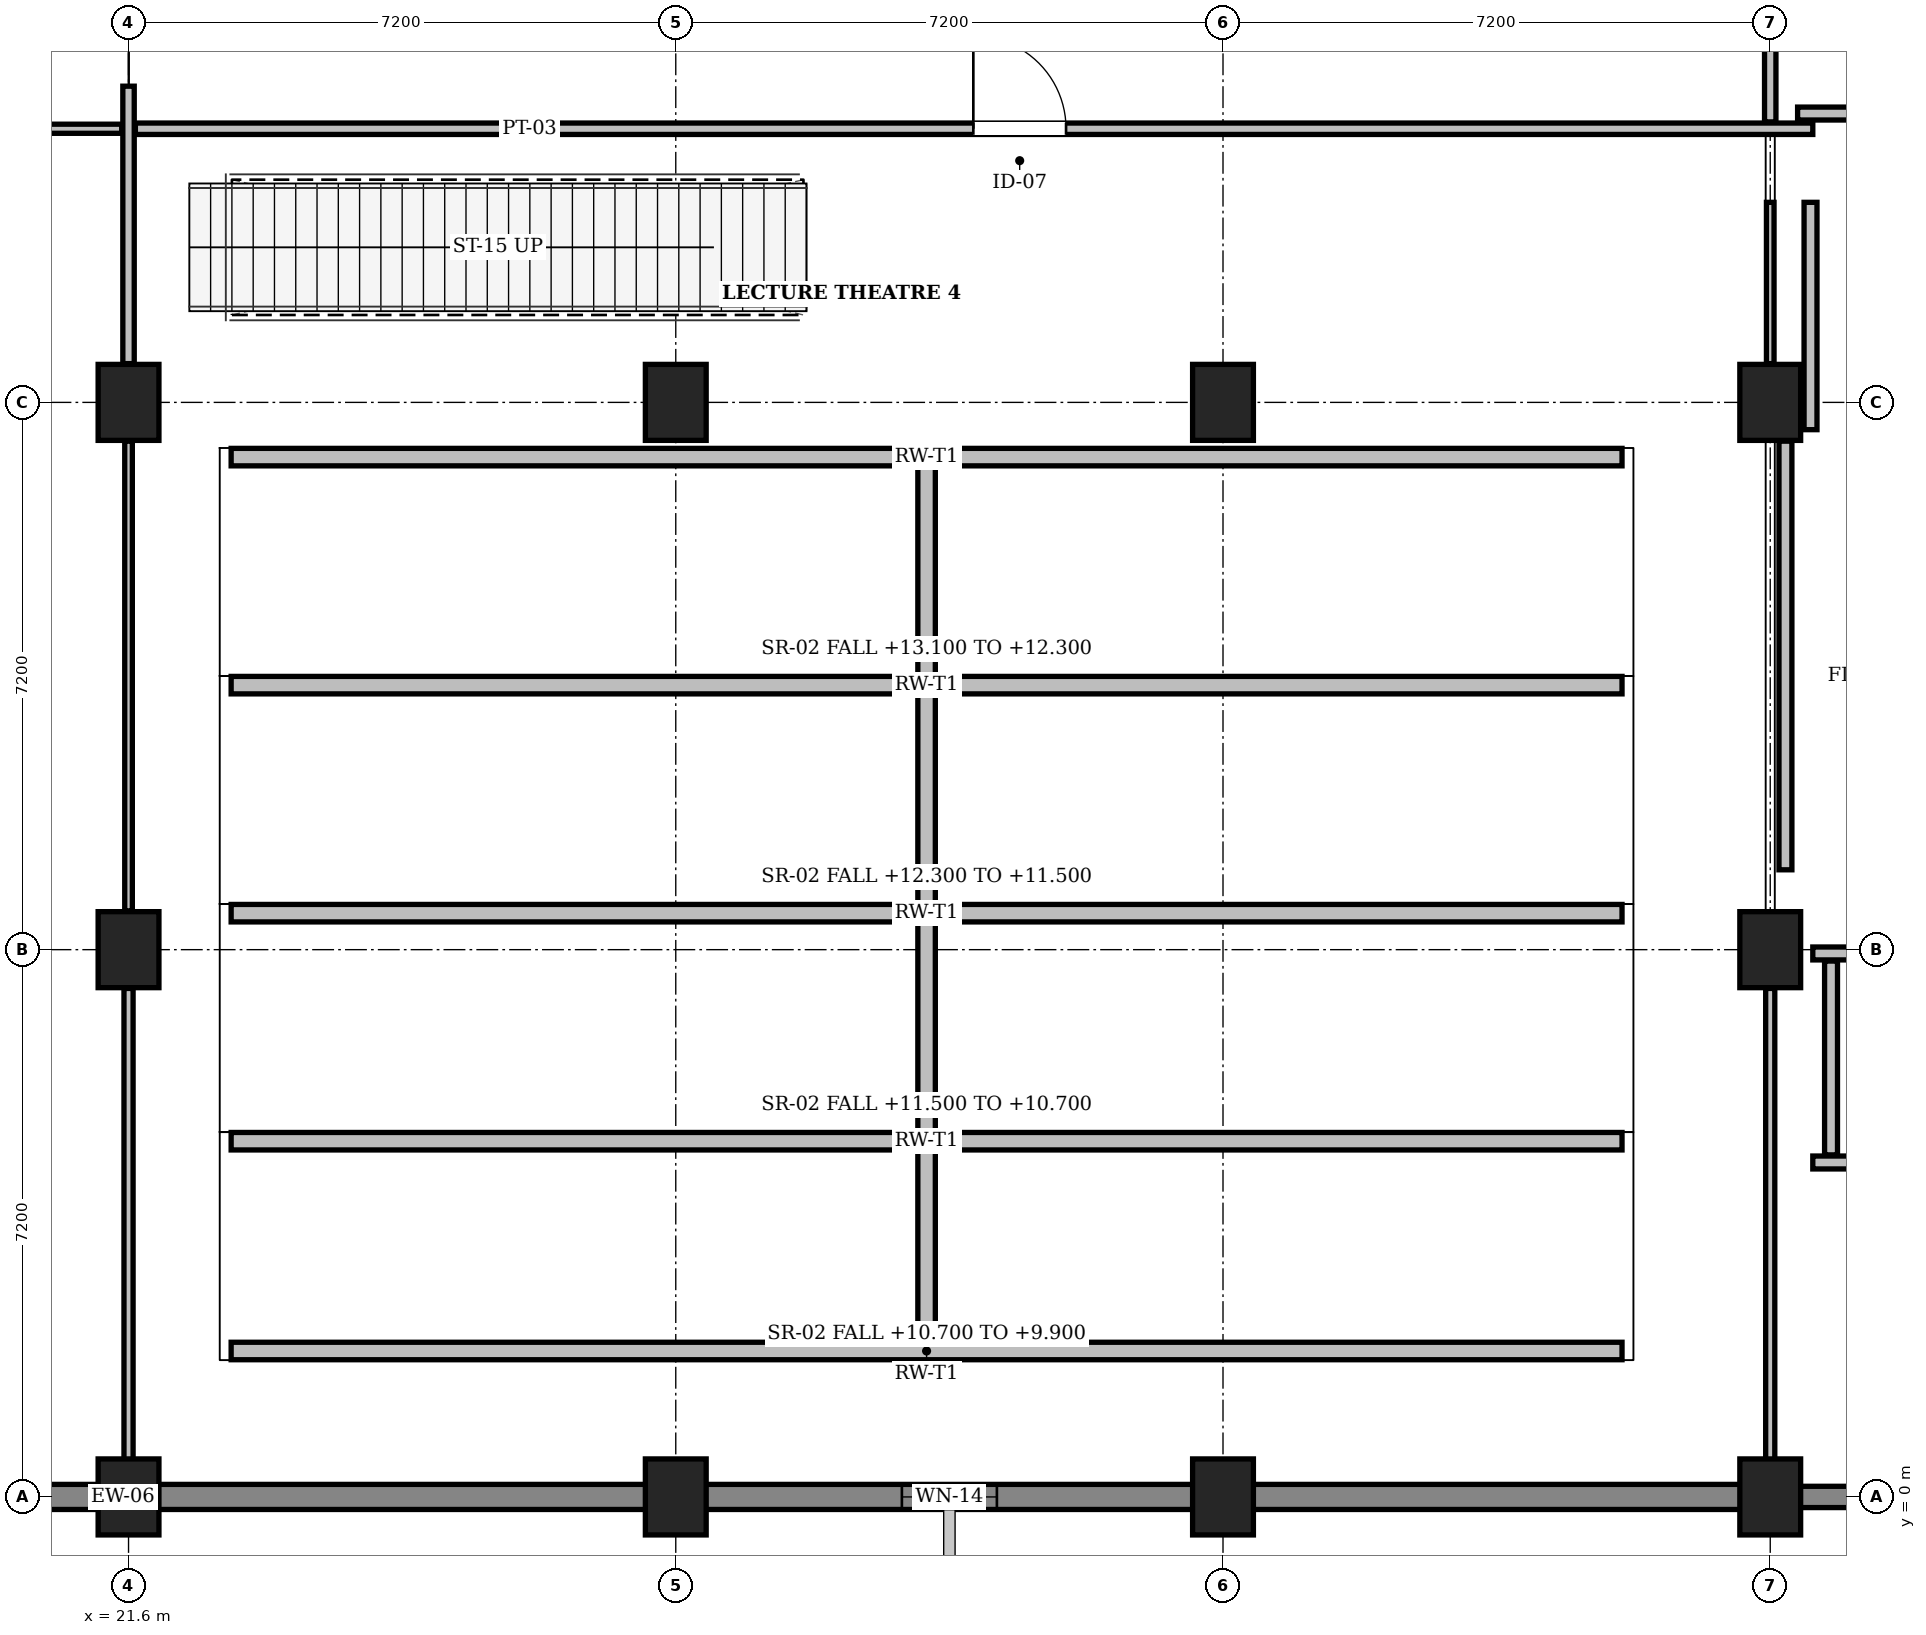
"""IFC4 building model, lengths in metres.
Left out: names, types, materials, properties, quantities, classifications, styles, units other than length and angle.
Written with IfcOpenShell. Run it as: python <this file> out.ifc"""

import sys

from ifc_helpers import new_model, si_unit, direction, frame, frame_2d, origin, origin_2d, place, context, subcontext, project, spatial, rectangle, extrude, element, fill, save


model = new_model("IFC4")
c1 = context("Model", 3, precision=1e-05, world=origin(), true_north=direction((0.0, 1.0)))
c2 = subcontext(c1, "Body", "Model", "MODEL_VIEW")
j1 = project(units=[si_unit("LENGTHUNIT", "METRE"), si_unit("PLANEANGLEUNIT", "RADIAN")], contexts=[c1])
p1 = place(None, origin())
s1 = spatial("IfcSite", under=j1, at=p1, CompositionType="ELEMENT")
p2 = place(p1, origin())
s2 = spatial("IfcBuilding", under=s1, at=p2, CompositionType="ELEMENT")
p3 = place(p2, frame((0.0, 0.0, 9.6)))
s3 = spatial("IfcBuildingStorey", under=s2, at=p3, CompositionType="ELEMENT", Elevation=9.6)
for number, where, z_axis, x_axis in (
    (1, (21.6, 0.0, 0.0), (0.0, 0.0, 1.0), (1.0, 0.0, 0.0)),
    (2, (21.6, 7.2, 0.0), (0.0, 0.0, 1.0), (1.0, 0.0, 0.0)),
    (3, (21.6, 14.4, 0.0), (0.0, 0.0, 1.0), (1.0, 0.0, 0.0)),
    (4, (28.8, 0.0, 0.0), (0.0, 0.0, 1.0), (1.0, 0.0, 0.0)),
    (5, (28.8, 14.4, 0.0), (0.0, 0.0, 1.0), (1.0, 0.0, 0.0)),
    (6, (36.0, 0.0, 0.0), (0.0, 0.0, 1.0), (1.0, 0.0, 0.0)),
    (7, (36.0, 14.4, 0.0), (0.0, 0.0, 1.0), (1.0, 0.0, 0.0)),
    (8, (43.2, 0.0, 0.0), (0.0, 0.0, 1.0), (1.0, 0.0, 0.0)),
    (9, (43.2, 7.2, 0.0), (0.0, 0.0, 1.0), (1.0, 0.0, 0.0)),
    (10, (43.2, 14.4, 0.0), (0.0, 0.0, 1.0), (1.0, 0.0, 0.0)),
):
    element("IfcColumn", number, at=place(p3, frame(where, z_axis=z_axis, x_axis=x_axis)), inside=s3, PredefinedType="COLUMN", context=c2, shape_type="SweptSolid", body=[
        extrude(rectangle(XDim=0.8, YDim=1.0, at=origin_2d()), origin(), (0.0, 0.0, 1.0), 4.8),
    ])
p4 = place(p3, frame((22.95, 1.92, 0.0), z_axis=(0.0, 0.0, 1.0), x_axis=(1.0, 0.0, 0.0)))
e11 = element("IfcWall", 11, at=p4, inside=s3, PredefinedType="SOLIDWALL", context=c2, shape_type="SweptSolid", body=[
    extrude(rectangle(XDim=18.3, YDim=0.23, at=frame_2d((9.15, 0.0))), origin(), (0.0, 0.0, 1.0), 0.13),
])
p5 = place(p3, frame((22.95, 4.68, 0.0), z_axis=(0.0, 0.0, 1.0), x_axis=(1.0, 0.0, 0.0)))
e12 = element("IfcWall", 12, at=p5, inside=s3, PredefinedType="SOLIDWALL", context=c2, shape_type="SweptSolid", body=[
    extrude(rectangle(XDim=18.3, YDim=0.23, at=frame_2d((9.15, 0.0))), origin(), (0.0, 0.0, 1.0), 0.91),
])
p6 = place(p3, frame((32.1, 2.035, 0.0), z_axis=(0.0, 0.0, 1.0), x_axis=(0.0, 1.0, 0.0)))
e13 = element("IfcWall", 13, at=p6, inside=s3, PredefinedType="SOLIDWALL", context=c2, shape_type="SweptSolid", body=[
    extrude(rectangle(XDim=2.53, YDim=0.23, at=frame_2d((1.265, 0.0))), origin(), (0.0, 0.0, 1.0), 0.51),
])
p7 = place(p3, frame((22.95, 7.68, 0.0), z_axis=(0.0, 0.0, 1.0), x_axis=(1.0, 0.0, 0.0)))
e14 = element("IfcWall", 14, at=p7, inside=s3, PredefinedType="SOLIDWALL", context=c2, shape_type="SweptSolid", body=[
    extrude(rectangle(XDim=18.3, YDim=0.23, at=frame_2d((9.15, 0.0))), origin(), (0.0, 0.0, 1.0), 1.71),
])
p8 = place(p3, frame((32.1, 4.795, 0.0), z_axis=(0.0, 0.0, 1.0), x_axis=(0.0, 1.0, 0.0)))
e15 = element("IfcWall", 15, at=p8, inside=s3, PredefinedType="SOLIDWALL", context=c2, shape_type="SweptSolid", body=[
    extrude(rectangle(XDim=2.77, YDim=0.23, at=frame_2d((1.385, 0.0))), origin(), (0.0, 0.0, 1.0), 1.31),
])
p9 = place(p3, frame((22.95, 10.68, 0.0), z_axis=(0.0, 0.0, 1.0), x_axis=(1.0, 0.0, 0.0)))
e16 = element("IfcWall", 16, at=p9, inside=s3, PredefinedType="SOLIDWALL", context=c2, shape_type="SweptSolid", body=[
    extrude(rectangle(XDim=18.3, YDim=0.23, at=frame_2d((9.15, 0.0))), origin(), (0.0, 0.0, 1.0), 2.51),
])
p10 = place(p3, frame((32.1, 7.795, 0.0), z_axis=(0.0, 0.0, 1.0), x_axis=(0.0, 1.0, 0.0)))
e17 = element("IfcWall", 17, at=p10, inside=s3, PredefinedType="SOLIDWALL", context=c2, shape_type="SweptSolid", body=[
    extrude(rectangle(XDim=2.77, YDim=0.23, at=frame_2d((1.385, 0.0))), origin(), (0.0, 0.0, 1.0), 2.11),
])
p11 = place(p3, frame((22.95, 13.68, 0.0), z_axis=(0.0, 0.0, 1.0), x_axis=(1.0, 0.0, 0.0)))
e18 = element("IfcWall", 18, at=p11, inside=s3, PredefinedType="SOLIDWALL", context=c2, shape_type="SweptSolid", body=[
    extrude(rectangle(XDim=18.3, YDim=0.23, at=frame_2d((9.15, 0.0))), origin(), (0.0, 0.0, 1.0), 3.31),
])
p12 = place(p3, frame((32.1, 10.795, 0.0), z_axis=(0.0, 0.0, 1.0), x_axis=(0.0, 1.0, 0.0)))
e19 = element("IfcWall", 19, at=p12, inside=s3, PredefinedType="SOLIDWALL", context=c2, shape_type="SweptSolid", body=[
    extrude(rectangle(XDim=2.77, YDim=0.23, at=frame_2d((1.385, 0.0))), origin(), (0.0, 0.0, 1.0), 2.91),
])
p13 = place(p3, frame((50.4, 0.0, 0.0), z_axis=(0.0, 0.0, 1.0), x_axis=(-1.0, 0.0, 0.0)))
e20 = element("IfcWall", 20, at=p13, inside=s3, PredefinedType="SOLIDWALL", context=c2, shape_type="SweptSolid", body=[
    extrude(rectangle(XDim=7.2, YDim=0.28, at=frame_2d((3.6, 0.0))), origin(), (0.0, 0.0, 1.0), 4.52),
])
p14 = place(p13, frame((3.05, 0.0, 0.95)))
e21 = element("IfcOpeningElement", 21, at=p14, cuts=e20, PredefinedType="OPENING", context=c2, shape_type="SweptSolid", body=[
    extrude(rectangle(XDim=1.1, YDim=1.55, at=frame_2d((0.55, 0.775))), frame((0.0, 0.152, 0.0), z_axis=(0.0, -1.0, 0.0), x_axis=(1.0, 0.0, 0.0)), (0.0, 0.0, 1.0), 0.304),
])
p15 = place(p3, frame((43.2, 0.0, 0.0), z_axis=(0.0, 0.0, 1.0), x_axis=(-1.0, 0.0, 0.0)))
e22 = element("IfcWall", 22, at=p15, inside=s3, PredefinedType="SOLIDWALL", context=c2, shape_type="SweptSolid", body=[
    extrude(rectangle(XDim=7.2, YDim=0.33, at=frame_2d((3.6, 0.0))), origin(), (0.0, 0.0, 1.0), 4.52),
])
p16 = place(p3, frame((36.0, 0.0, 0.0), z_axis=(0.0, 0.0, 1.0), x_axis=(-1.0, 0.0, 0.0)))
e23 = element("IfcWall", 23, at=p16, inside=s3, PredefinedType="SOLIDWALL", context=c2, shape_type="SweptSolid", body=[
    extrude(rectangle(XDim=7.2, YDim=0.33, at=frame_2d((3.6, 0.0))), origin(), (0.0, 0.0, 1.0), 4.52),
])
p17 = place(p16, frame((2.975, 0.0, 0.95)))
e24 = element("IfcOpeningElement", 24, at=p17, cuts=e23, PredefinedType="OPENING", context=c2, shape_type="SweptSolid", body=[
    extrude(rectangle(XDim=1.25, YDim=1.55, at=frame_2d((0.625, 0.775))), frame((0.0, 0.177, 0.0), z_axis=(0.0, -1.0, 0.0), x_axis=(1.0, 0.0, 0.0)), (0.0, 0.0, 1.0), 0.354),
])
p18 = place(p3, frame((28.8, 0.0, 0.0), z_axis=(0.0, 0.0, 1.0), x_axis=(-1.0, 0.0, 0.0)))
e25 = element("IfcWall", 25, at=p18, inside=s3, PredefinedType="SOLIDWALL", context=c2, shape_type="SweptSolid", body=[
    extrude(rectangle(XDim=7.2, YDim=0.33, at=frame_2d((3.6, 0.0))), origin(), (0.0, 0.0, 1.0), 4.52),
])
p19 = place(p3, frame((21.6, 0.0, 0.0), z_axis=(0.0, 0.0, 1.0), x_axis=(-1.0, 0.0, 0.0)))
e26 = element("IfcWall", 26, at=p19, inside=s3, PredefinedType="SOLIDWALL", context=c2, shape_type="SweptSolid", body=[
    extrude(rectangle(XDim=7.2, YDim=0.33, at=frame_2d((3.6, 0.0))), origin(), (0.0, 0.0, 1.0), 4.52),
])
p20 = place(p19, frame((2.9, 0.0, 0.95)))
e27 = element("IfcOpeningElement", 27, at=p20, cuts=e26, PredefinedType="OPENING", context=c2, shape_type="SweptSolid", body=[
    extrude(rectangle(XDim=1.4, YDim=1.55, at=frame_2d((0.7, 0.775))), frame((0.0, 0.177, 0.0), z_axis=(0.0, -1.0, 0.0), x_axis=(1.0, 0.0, 0.0)), (0.0, 0.0, 1.0), 0.354),
])
p21 = place(p3, frame((43.73, 14.041, 0.0), z_axis=(0.0, 0.0, 1.0), x_axis=(0.0, 1.0, 0.0)))
e28 = element("IfcWall", 28, at=p21, inside=s3, PredefinedType="PARTITIONING", context=c2, shape_type="SweptSolid", body=[
    extrude(rectangle(XDim=2.991, YDim=0.17, at=frame_2d((1.496, 0.0))), origin(), (0.0, 0.0, 1.0), 4.46),
])
p22 = place(p3, frame((43.56, 18.2, 0.0), z_axis=(0.0, 0.0, 1.0), x_axis=(1.0, 0.0, 0.0)))
e29 = element("IfcWall", 29, at=p22, inside=s3, PredefinedType="PARTITIONING", context=c2, shape_type="SweptSolid", body=[
    extrude(rectangle(XDim=16.063, YDim=0.17, at=frame_2d((8.032, 0.0))), origin(), (0.0, 0.0, 1.0), 4.46),
])
p23 = place(p22, frame((7.292, 0.0, 0.0)))
e30 = element("IfcOpeningElement", 30, at=p23, cuts=e29, PredefinedType="OPENING", context=c2, shape_type="SweptSolid", body=[
    extrude(rectangle(XDim=1.48, YDim=2.26, at=frame_2d((0.74, 1.13))), frame((0.0, 0.097, 0.0), z_axis=(0.0, -1.0, 0.0), x_axis=(1.0, 0.0, 0.0)), (0.0, 0.0, 1.0), 0.194),
])
p24 = place(p3, frame((43.76, 7.15, 0.0), z_axis=(0.0, 0.0, 1.0), x_axis=(1.0, 0.0, 0.0)))
e31 = element("IfcWall", 31, at=p24, inside=s3, PredefinedType="PARTITIONING", context=c2, shape_type="SweptSolid", body=[
    extrude(rectangle(XDim=6.23, YDim=0.17, at=frame_2d((3.115, 0.0))), origin(), (0.0, 0.0, 1.0), 3.93),
])
p25 = place(p3, frame((43.76, 4.4, 0.0), z_axis=(0.0, 0.0, 1.0), x_axis=(1.0, 0.0, 0.0)))
e32 = element("IfcWall", 32, at=p25, inside=s3, PredefinedType="PARTITIONING", context=c2, shape_type="SweptSolid", body=[
    extrude(rectangle(XDim=15.864, YDim=0.17, at=frame_2d((7.932, 0.0))), origin(), (0.0, 0.0, 1.0), 4.46),
])
p26 = place(p25, frame((7.152, 0.0, 0.0)))
e33 = element("IfcOpeningElement", 33, at=p26, cuts=e32, PredefinedType="OPENING", context=c2, shape_type="SweptSolid", body=[
    extrude(rectangle(XDim=1.56, YDim=2.26, at=frame_2d((0.78, 1.13))), frame((0.0, 0.097, 0.0), z_axis=(0.0, -1.0, 0.0), x_axis=(1.0, 0.0, 0.0)), (0.0, 0.0, 1.0), 0.194),
])
p27 = place(p3, frame((44.0, 4.5, 0.0), z_axis=(0.0, 0.0, 1.0), x_axis=(0.0, 1.0, 0.0)))
e34 = element("IfcWall", 34, at=p27, inside=s3, PredefinedType="PARTITIONING", context=c2, shape_type="SweptSolid", body=[
    extrude(rectangle(XDim=2.55, YDim=0.17, at=frame_2d((1.275, 0.0))), origin(), (0.0, 0.0, 1.0), 4.46),
])
p28 = place(p3, frame((43.4, 8.25, 0.0), z_axis=(0.0, 0.0, 1.0), x_axis=(0.0, 1.0, 0.0)))
e35 = element("IfcWall", 35, at=p28, inside=s3, PredefinedType="PARTITIONING", context=c2, shape_type="SweptSolid", body=[
    extrude(rectangle(XDim=5.639, YDim=0.17, at=frame_2d((2.82, 0.0))), origin(), (0.0, 0.0, 1.0), 4.03),
])
p29 = place(p3, frame((21.6, 0.177, 0.0), z_axis=(0.0, 0.0, 1.0), x_axis=(0.0, 1.0, 0.0)))
e36 = element("IfcWall", 36, at=p29, inside=s3, PredefinedType="PARTITIONING", context=c2, shape_type="SweptSolid", body=[
    extrude(rectangle(XDim=6.513, YDim=0.12, at=frame_2d((3.256, 0.0))), origin(), (0.0, 0.0, 1.0), 4.03),
])
p30 = place(p3, frame((21.6, 7.71, 0.0), z_axis=(0.0, 0.0, 1.0), x_axis=(0.0, 1.0, 0.0)))
e37 = element("IfcWall", 37, at=p30, inside=s3, PredefinedType="PARTITIONING", context=c2, shape_type="SweptSolid", body=[
    extrude(rectangle(XDim=6.18, YDim=0.1, at=frame_2d((3.09, 0.0))), origin(), (0.0, 0.0, 1.0), 4.03),
])
p31 = place(p3, frame((21.6, 14.91, 0.0), z_axis=(0.0, 0.0, 1.0), x_axis=(0.0, 1.0, 0.0)))
e38 = element("IfcWall", 38, at=p31, inside=s3, PredefinedType="PARTITIONING", context=c2, shape_type="SweptSolid", body=[
    extrude(rectangle(XDim=3.65, YDim=0.15, at=frame_2d((1.825, 0.0))), origin(), (0.0, 0.0, 1.0), 4.03),
])
p32 = place(p3, frame((12.5, 18.0, 0.0), z_axis=(0.0, 0.0, 1.0), x_axis=(1.0, 0.0, 0.0)))
e39 = element("IfcWall", 39, at=p32, inside=s3, PredefinedType="PARTITIONING", context=c2, shape_type="SweptSolid", body=[
    extrude(rectangle(XDim=9.01, YDim=0.12, at=frame_2d((4.505, 0.0))), origin(), (0.0, 0.0, 1.0), 4.46),
])
p33 = place(p3, frame((21.69, 18.0, 0.0), z_axis=(0.0, 0.0, 1.0), x_axis=(1.0, 0.0, 0.0)))
e40 = element("IfcWall", 40, at=p33, inside=s3, PredefinedType="PARTITIONING", context=c2, shape_type="SweptSolid", body=[
    extrude(rectangle(XDim=22.07, YDim=0.15, at=frame_2d((11.035, 0.0))), origin(), (0.0, 0.0, 1.0), 4.46),
])
p34 = place(p33, frame((11.025, 0.0, 0.0)))
e41 = element("IfcOpeningElement", 41, at=p34, cuts=e40, PredefinedType="OPENING", context=c2, shape_type="SweptSolid", body=[
    extrude(rectangle(XDim=1.22, YDim=2.22, at=frame_2d((0.61, 1.11))), frame((0.0, 0.087, 0.0), z_axis=(0.0, -1.0, 0.0), x_axis=(1.0, 0.0, 0.0)), (0.0, 0.0, 1.0), 0.174),
])
p35 = place(p3, frame((43.2, 0.177, 0.0), z_axis=(0.0, 0.0, 1.0), x_axis=(0.0, 1.0, 0.0)))
e42 = element("IfcWall", 42, at=p35, inside=s3, PredefinedType="PARTITIONING", context=c2, shape_type="SweptSolid", body=[
    extrude(rectangle(XDim=6.513, YDim=0.12, at=frame_2d((3.256, 0.0))), origin(), (0.0, 0.0, 1.0), 4.03),
])
p36 = place(p3, frame((43.2, 14.91, 0.0), z_axis=(0.0, 0.0, 1.0), x_axis=(0.0, 1.0, 0.0)))
e43 = element("IfcWall", 43, at=p36, inside=s3, PredefinedType="PARTITIONING", context=c2, shape_type="SweptSolid", body=[
    extrude(rectangle(XDim=2.122, YDim=0.1, at=frame_2d((1.061, 0.0))), origin(), (0.0, 0.0, 1.0), 4.03),
])
p37 = place(p3, frame((43.2, 18.09, 0.0), z_axis=(0.0, 0.0, 1.0), x_axis=(0.0, 1.0, 0.0)))
e44 = element("IfcWall", 44, at=p37, inside=s3, PredefinedType="PARTITIONING", context=c2, shape_type="SweptSolid", body=[
    extrude(rectangle(XDim=3.0, YDim=0.15, at=frame_2d((1.5, 0.0))), origin(), (0.0, 0.0, 1.0), 4.03),
])
p38 = place(p17, origin())
e45 = element("IfcWindow", 45, at=p38, inside=s3, PartitioningType="SINGLE_PANEL", PredefinedType="WINDOW", context=c2, shape_type="SweptSolid", body=[
    extrude(rectangle(XDim=1.25, YDim=1.55, at=frame_2d((0.625, 0.775))), frame((0.0, 0.03, 0.0), z_axis=(0.0, -1.0, 0.0), x_axis=(1.0, 0.0, 0.0)), (0.0, 0.0, 1.0), 0.06),
])
fill(e24, e45)
p39 = place(p34, origin())
e46 = element("IfcDoor", 46, at=p39, inside=s3, OperationType="SINGLE_SWING_LEFT", PredefinedType="DOOR", context=c2, shape_type="SweptSolid", body=[
    extrude(rectangle(XDim=1.22, YDim=2.22, at=frame_2d((0.61, 1.11))), frame((0.0, 0.025, 0.0), z_axis=(0.0, -1.0, 0.0), x_axis=(1.0, 0.0, 0.0)), (0.0, 0.0, 1.0), 0.05),
])
fill(e41, e46)
save(model, sys.argv[1])
